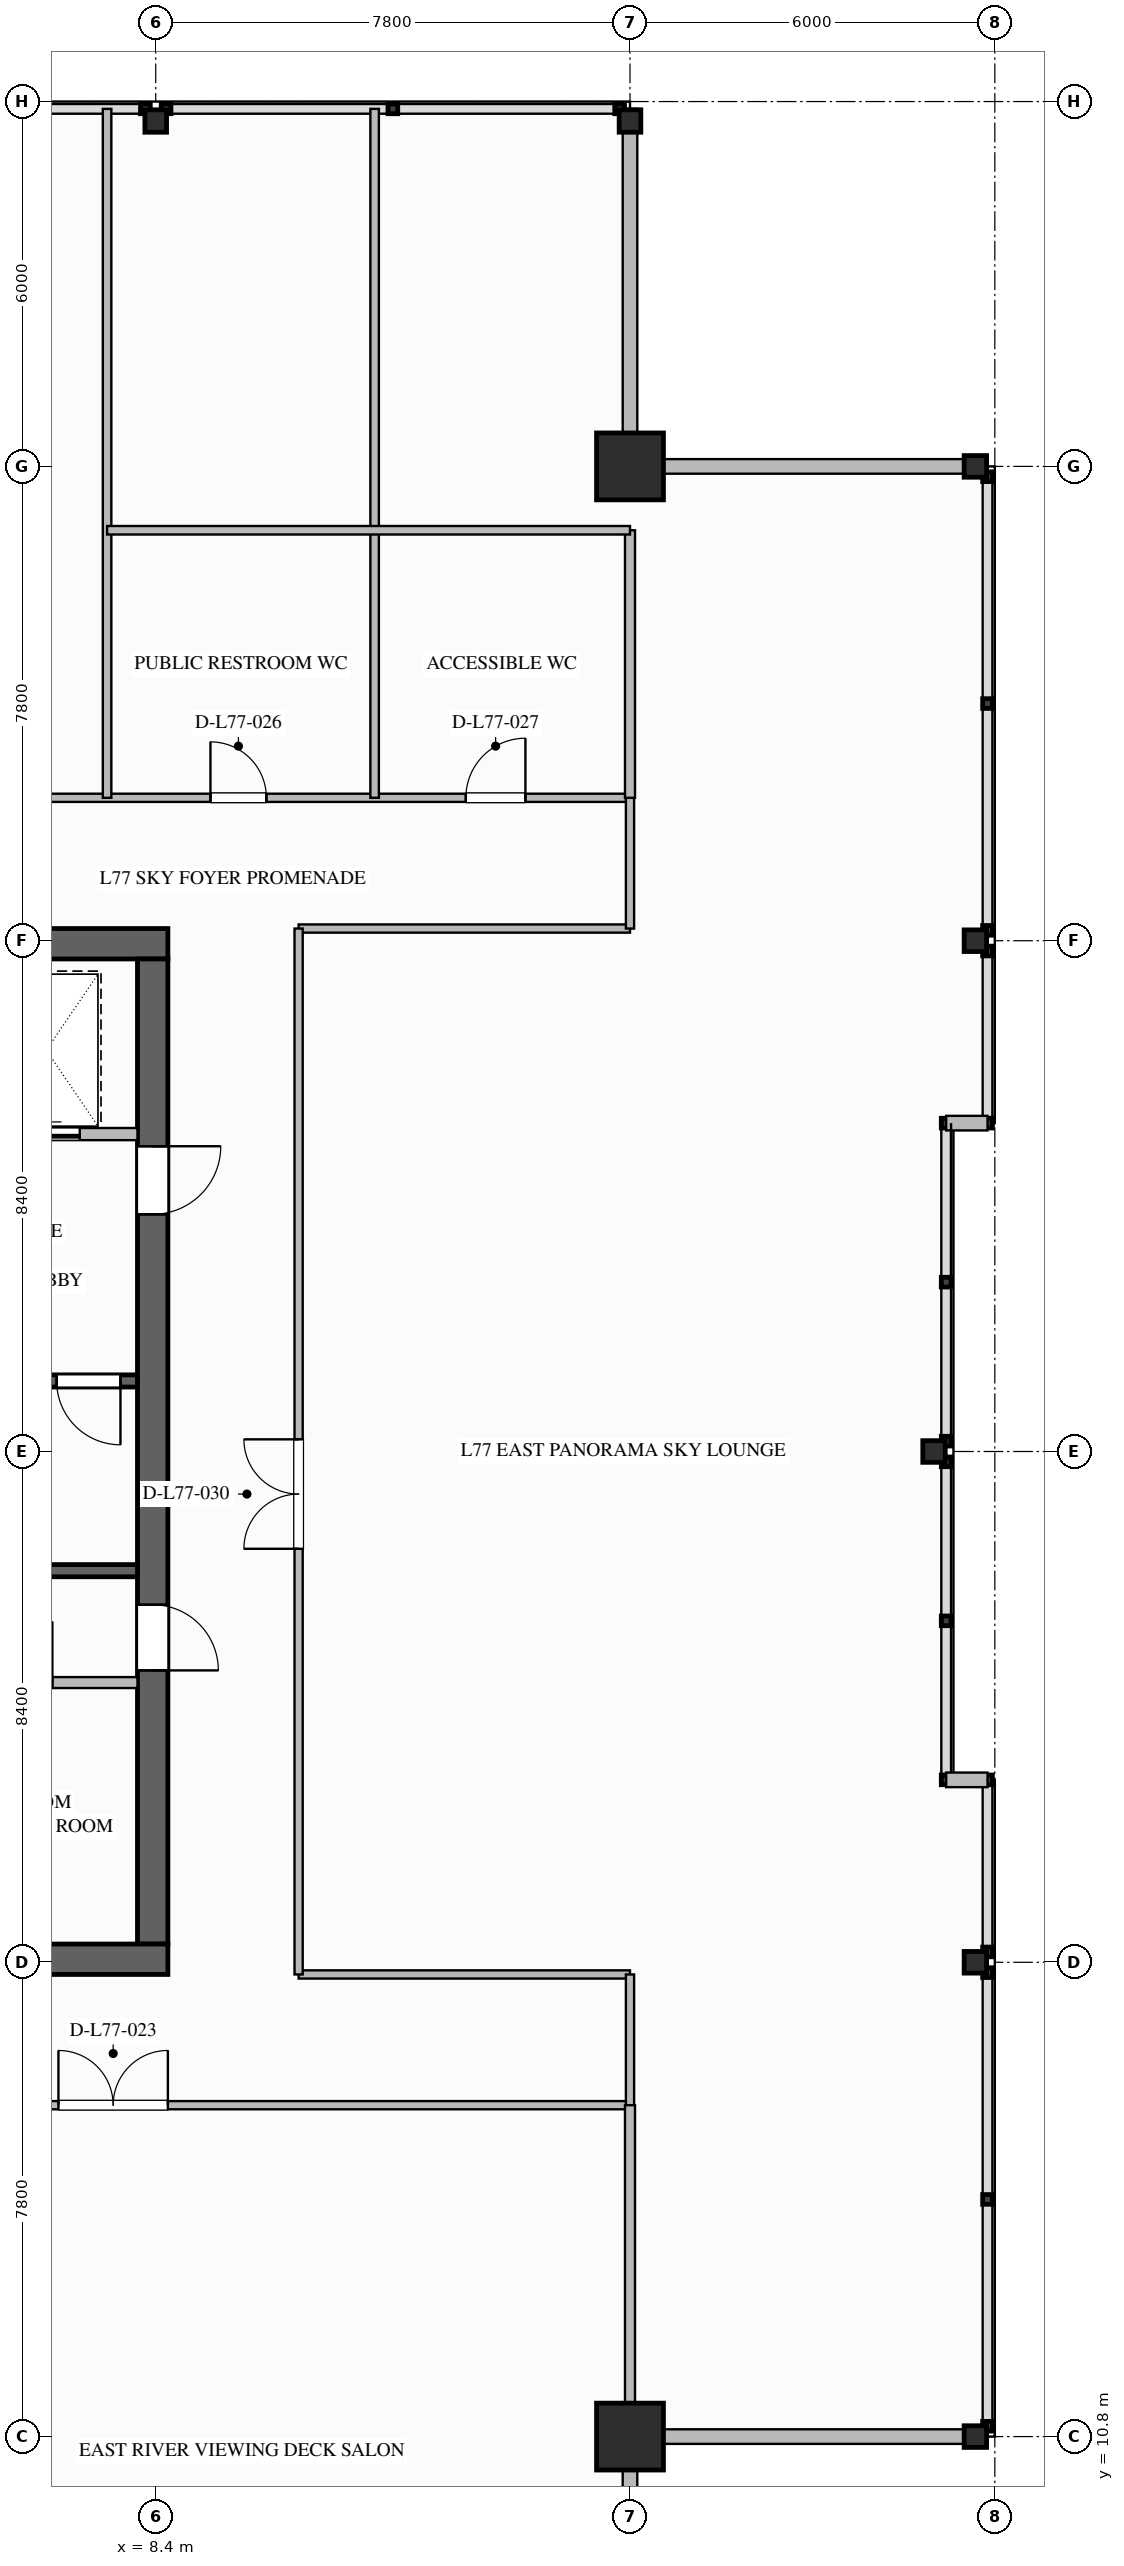
"""IFC4 building model, lengths in metres.
Left out: names, types, materials, properties, quantities, classifications, styles, units other than length and angle.
Written with IfcOpenShell. Run it as: python <this file> out.ifc"""

import sys

from ifc_helpers import new_model, si_unit, direction, frame, frame_2d, origin, origin_2d, place, context, subcontext, project, spatial, rectangle, i_section, extrude, element, fill, save


model = new_model("IFC4")
c1 = context("Model", 3, precision=1e-05, world=origin(), true_north=direction((0.0, 1.0)))
c2 = subcontext(c1, "Body", "Model", "MODEL_VIEW")
j1 = project(units=[si_unit("LENGTHUNIT", "METRE"), si_unit("PLANEANGLEUNIT", "RADIAN")], contexts=[c1])
p1 = place(None, origin())
s1 = spatial("IfcSite", under=j1, at=p1, CompositionType="ELEMENT")
p2 = place(p1, origin())
s2 = spatial("IfcBuilding", under=s1, at=p2, CompositionType="ELEMENT")
p3 = place(p2, frame((0.0, 0.0, 294.2)))
s3 = spatial("IfcBuildingStorey", under=s2, at=p3, CompositionType="ELEMENT", Elevation=294.2)
p4 = place(p3, frame((-8.6, 35.35, 0.0), z_axis=(0.0, 0.0, 1.0), x_axis=(1.0, 0.0, 0.0)))
e1 = element("IfcWall", 1, at=p4, inside=s3, PredefinedType="SHEAR", context=c2, shape_type="SweptSolid", body=[
    extrude(rectangle(XDim=17.2, YDim=0.5, at=frame_2d((8.6, 0.0))), origin(), (0.0, 0.0, 1.0), 4.4),
])
p5 = place(p3, frame((8.35, 35.1, 0.0), z_axis=(0.0, 0.0, 1.0), x_axis=(0.0, -1.0, 0.0)))
e2 = element("IfcWall", 2, at=p5, inside=s3, PredefinedType="SHEAR", context=c2, shape_type="SweptSolid", body=[
    extrude(rectangle(XDim=16.2, YDim=0.5, at=frame_2d((8.1, 0.0))), origin(), (0.0, 0.0, 1.0), 4.4),
])
p6 = place(p5, frame((3.08, 0.0, 0.0)))
e3 = element("IfcOpeningElement", 3, at=p6, cuts=e2, PredefinedType="OPENING", context=c2, shape_type="SweptSolid", body=[
    extrude(rectangle(XDim=1.12, YDim=2.1, at=frame_2d((0.56, 1.05))), frame((0.0, 0.26, 0.0), z_axis=(0.0, -1.0, 0.0), x_axis=(1.0, 0.0, 0.0)), (0.0, 0.0, 1.0), 0.52),
])
p7 = place(p5, frame((10.62, 0.0, 0.0)))
e4 = element("IfcOpeningElement", 4, at=p7, cuts=e2, PredefinedType="OPENING", context=c2, shape_type="SweptSolid", body=[
    extrude(rectangle(XDim=1.08, YDim=2.04, at=frame_2d((0.54, 1.02))), frame((0.0, 0.26, 0.0), z_axis=(0.0, -1.0, 0.0), x_axis=(1.0, 0.0, 0.0)), (0.0, 0.0, 1.0), 0.52),
])
p8 = place(p3, frame((8.6, 18.65, 0.0), z_axis=(0.0, 0.0, 1.0), x_axis=(-1.0, 0.0, 0.0)))
e5 = element("IfcWall", 5, at=p8, inside=s3, PredefinedType="SHEAR", context=c2, shape_type="SweptSolid", body=[
    extrude(rectangle(XDim=17.2, YDim=0.5, at=frame_2d((8.6, 0.0))), origin(), (0.0, 0.0, 1.0), 4.4),
])
for number, where, z_axis, x_axis in (
    (6, (16.2, 10.8, 0.0), (0.0, 0.0, 1.0), (1.0, 0.0, 0.0)),
    (7, (16.2, 43.2, 0.0), (0.0, 0.0, 1.0), (1.0, 0.0, 0.0)),
):
    element("IfcColumn", number, at=place(p3, frame(where, z_axis=z_axis, x_axis=x_axis)), inside=s3, PredefinedType="COLUMN", context=c2, shape_type="SweptSolid", body=[
        extrude(rectangle(XDim=1.1, YDim=1.1, at=origin_2d()), origin(), (0.0, 0.0, 1.0), 4.4),
    ])
for number, where, z_axis, x_axis in (
    (8, (21.88, 10.8, 0.0), (0.0, 0.0, 1.0), (1.0, 0.0, 0.0)),
    (9, (21.88, 18.6, 0.0), (0.0, 0.0, 1.0), (1.0, 0.0, 0.0)),
    (10, (21.2, 27.0, 0.0), (0.0, 0.0, 1.0), (1.0, 0.0, 0.0)),
    (11, (21.88, 35.4, 0.0), (0.0, 0.0, 1.0), (1.0, 0.0, 0.0)),
    (12, (21.88, 43.2, 0.0), (0.0, 0.0, 1.0), (1.0, 0.0, 0.0)),
    (13, (8.4, 48.88, 0.0), (0.0, 0.0, 1.0), (0.0, 1.0, 0.0)),
    (14, (16.2, 48.88, 0.0), (0.0, 0.0, 1.0), (0.0, 1.0, 0.0)),
):
    element("IfcColumn", number, at=place(p3, frame(where, z_axis=z_axis, x_axis=x_axis)), inside=s3, PredefinedType="COLUMN", context=c2, shape_type="SweptSolid", body=[
        extrude(i_section(OverallWidth=0.369, OverallDepth=0.356, WebThickness=0.011, FlangeThickness=0.018, FilletRadius=0.025, at=origin_2d()), origin(), (0.0, 0.0, 1.0), 4.397),
    ])
for number, where, z_axis, x_axis in (
    (15, (16.2, 49.08, 0.0), (0.0, 0.0, 1.0), (0.0, -1.0, 0.0)),
    (16, (16.2, 43.2, 0.0), (0.0, 0.0, 1.0), (1.0, 0.0, 0.0)),
    (17, (22.08, 10.8, 0.0), (0.0, 0.0, 1.0), (-1.0, 0.0, 0.0)),
    (18, (16.2, 10.8, 0.0), (0.0, 0.0, 1.0), (0.0, -1.0, 0.0)),
):
    element("IfcWall", number, at=place(p3, frame(where, z_axis=z_axis, x_axis=x_axis)), inside=s3, PredefinedType="STANDARD", context=c2, shape_type="SweptSolid", body=[
        extrude(rectangle(XDim=5.88, YDim=0.24, at=frame_2d((2.94, 0.0))), origin(), (0.0, 0.0, 1.0), 3.489),
    ])
for number, where, z_axis, x_axis in (
    (19, (22.08, 32.4, 0.0), (0.0, 0.0, 1.0), (-1.0, 0.0, 0.0)),
    (20, (21.4, 21.6, 0.0), (0.0, 0.0, 1.0), (1.0, 0.0, 0.0)),
):
    element("IfcWall", number, at=place(p3, frame(where, z_axis=z_axis, x_axis=x_axis)), inside=s3, PredefinedType="STANDARD", context=c2, shape_type="SweptSolid", body=[
        extrude(rectangle(XDim=0.68, YDim=0.24, at=frame_2d((0.34, 0.0))), origin(), (0.0, 0.0, 1.0), 4.1),
    ])
p9 = place(p3, frame((0.0, 25.04, 0.0), z_axis=(0.0, 0.0, 1.0), x_axis=(1.0, 0.0, 0.0)))
e21 = element("IfcWall", 21, at=p9, inside=s3, PredefinedType="SOLIDWALL", context=c2, shape_type="SweptSolid", body=[
    extrude(rectangle(XDim=8.1, YDim=0.2, at=frame_2d((4.05, 0.0))), origin(), (0.0, 0.0, 1.0), 4.1),
])
p10 = place(p3, frame((8.1, 28.16, 0.0), z_axis=(0.0, 0.0, 1.0), x_axis=(-1.0, 0.0, 0.0)))
e22 = element("IfcWall", 22, at=p10, inside=s3, PredefinedType="SOLIDWALL", context=c2, shape_type="SweptSolid", body=[
    extrude(rectangle(XDim=8.1, YDim=0.2, at=frame_2d((4.05, 0.0))), origin(), (0.0, 0.0, 1.0), 4.1),
])
p11 = place(p10, frame((0.28, 0.0, 0.0)))
e23 = element("IfcOpeningElement", 23, at=p11, cuts=e22, PredefinedType="OPENING", context=c2, shape_type="SweptSolid", body=[
    extrude(rectangle(XDim=1.05, YDim=2.1, at=frame_2d((0.525, 1.05))), frame((0.0, 0.11, 0.0), z_axis=(0.0, -1.0, 0.0), x_axis=(1.0, 0.0, 0.0)), (0.0, 0.0, 1.0), 0.22),
])
p12 = place(p3, frame((3.1, 32.22, 0.0), z_axis=(0.0, 0.0, 1.0), x_axis=(1.0, 0.0, 0.0)))
e24 = element("IfcWall", 24, at=p12, inside=s3, PredefinedType="SOLIDWALL", context=c2, shape_type="SweptSolid", body=[
    extrude(rectangle(XDim=5.0, YDim=0.2, at=frame_2d((2.5, 0.0))), origin(), (0.0, 0.0, 1.0), 4.1),
])
p13 = place(p12, frame((0.55, 0.0, 0.0)))
e25 = element("IfcOpeningElement", 25, at=p13, cuts=e24, PredefinedType="OPENING", context=c2, shape_type="SweptSolid", body=[
    extrude(rectangle(XDim=1.2, YDim=2.2, at=frame_2d((0.6, 1.1))), frame((0.0, 0.11, 0.0), z_axis=(0.0, -1.0, 0.0), x_axis=(1.0, 0.0, 0.0)), (0.0, 0.0, 1.0), 0.22),
])
p14 = place(p12, frame((2.85, 0.0, 0.0)))
e26 = element("IfcOpeningElement", 26, at=p14, cuts=e24, PredefinedType="OPENING", context=c2, shape_type="SweptSolid", body=[
    extrude(rectangle(XDim=1.2, YDim=2.2, at=frame_2d((0.6, 1.1))), frame((0.0, 0.11, 0.0), z_axis=(0.0, -1.0, 0.0), x_axis=(1.0, 0.0, 0.0)), (0.0, 0.0, 1.0), 0.22),
])
p15 = place(p3, frame((-8.1, 23.2, 0.0), z_axis=(0.0, 0.0, 1.0), x_axis=(1.0, 0.0, 0.0)))
e27 = element("IfcWall", 27, at=p15, inside=s3, PredefinedType="SOLIDWALL", context=c2, shape_type="SweptSolid", body=[
    extrude(rectangle(XDim=16.2, YDim=0.18, at=frame_2d((8.1, 0.0))), origin(), (0.0, 0.0, 1.0), 4.1),
])
p16 = place(p15, frame((1.4, 0.0, 0.0)))
e28 = element("IfcOpeningElement", 28, at=p16, cuts=e27, PredefinedType="OPENING", context=c2, shape_type="SweptSolid", body=[
    extrude(rectangle(XDim=1.0, YDim=2.1, at=frame_2d((0.5, 1.05))), frame((0.0, 0.1, 0.0), z_axis=(0.0, -1.0, 0.0), x_axis=(1.0, 0.0, 0.0)), (0.0, 0.0, 1.0), 0.2),
])
p17 = place(p15, frame((5.6, 0.0, 0.0)))
e29 = element("IfcOpeningElement", 29, at=p17, cuts=e27, PredefinedType="OPENING", context=c2, shape_type="SweptSolid", body=[
    extrude(rectangle(XDim=1.0, YDim=2.1, at=frame_2d((0.5, 1.05))), frame((0.0, 0.1, 0.0), z_axis=(0.0, -1.0, 0.0), x_axis=(1.0, 0.0, 0.0)), (0.0, 0.0, 1.0), 0.2),
])
p18 = place(p15, frame((9.8, 0.0, 0.0)))
e30 = element("IfcOpeningElement", 30, at=p18, cuts=e27, PredefinedType="OPENING", context=c2, shape_type="SweptSolid", body=[
    extrude(rectangle(XDim=0.92, YDim=2.1, at=frame_2d((0.46, 1.05))), frame((0.0, 0.1, 0.0), z_axis=(0.0, -1.0, 0.0), x_axis=(1.0, 0.0, 0.0)), (0.0, 0.0, 1.0), 0.2),
])
p19 = place(p15, frame((13.8, 0.0, 0.0)))
e31 = element("IfcOpeningElement", 31, at=p19, cuts=e27, PredefinedType="OPENING", context=c2, shape_type="SweptSolid", body=[
    extrude(rectangle(XDim=1.0, YDim=2.1, at=frame_2d((0.5, 1.05))), frame((0.0, 0.1, 0.0), z_axis=(0.0, -1.0, 0.0), x_axis=(1.0, 0.0, 0.0)), (0.0, 0.0, 1.0), 0.2),
])
p20 = place(p3, frame((-16.2, 16.25, 0.0), z_axis=(0.0, 0.0, 1.0), x_axis=(1.0, 0.0, 0.0)))
e32 = element("IfcWall", 32, at=p20, inside=s3, PredefinedType="PARTITIONING", context=c2, shape_type="SweptSolid", body=[
    extrude(rectangle(XDim=32.4, YDim=0.135, at=frame_2d((16.2, 0.0))), origin(), (0.0, 0.0, 1.0), 4.1),
])
p21 = place(p20, frame((5.0, 0.0, 0.0)))
e33 = element("IfcOpeningElement", 33, at=p21, cuts=e32, PredefinedType="OPENING", context=c2, shape_type="SweptSolid", body=[
    extrude(rectangle(XDim=1.8, YDim=2.35, at=frame_2d((0.9, 1.175))), frame((0.0, 0.077, 0.0), z_axis=(0.0, -1.0, 0.0), x_axis=(1.0, 0.0, 0.0)), (0.0, 0.0, 1.0), 0.155),
])
p22 = place(p20, frame((23.0, 0.0, 0.0)))
e34 = element("IfcOpeningElement", 34, at=p22, cuts=e32, PredefinedType="OPENING", context=c2, shape_type="SweptSolid", body=[
    extrude(rectangle(XDim=1.8, YDim=2.35, at=frame_2d((0.9, 1.175))), frame((0.0, 0.077, 0.0), z_axis=(0.0, -1.0, 0.0), x_axis=(1.0, 0.0, 0.0)), (0.0, 0.0, 1.0), 0.155),
])
p23 = place(p3, frame((-16.2, 37.75, 0.0), z_axis=(0.0, 0.0, 1.0), x_axis=(1.0, 0.0, 0.0)))
e35 = element("IfcWall", 35, at=p23, inside=s3, PredefinedType="PARTITIONING", context=c2, shape_type="SweptSolid", body=[
    extrude(rectangle(XDim=32.4, YDim=0.135, at=frame_2d((16.2, 0.0))), origin(), (0.0, 0.0, 1.0), 4.1),
])
p24 = place(p23, frame((4.0, 0.0, 0.0)))
e36 = element("IfcOpeningElement", 36, at=p24, cuts=e35, PredefinedType="OPENING", context=c2, shape_type="SweptSolid", body=[
    extrude(rectangle(XDim=1.26, YDim=2.2, at=frame_2d((0.63, 1.1))), frame((0.0, 0.077, 0.0), z_axis=(0.0, -1.0, 0.0), x_axis=(1.0, 0.0, 0.0)), (0.0, 0.0, 1.0), 0.155),
])
p25 = place(p23, frame((16.3, 0.0, 0.0)))
e37 = element("IfcOpeningElement", 37, at=p25, cuts=e35, PredefinedType="OPENING", context=c2, shape_type="SweptSolid", body=[
    extrude(rectangle(XDim=1.26, YDim=2.2, at=frame_2d((0.63, 1.1))), frame((0.0, 0.077, 0.0), z_axis=(0.0, -1.0, 0.0), x_axis=(1.0, 0.0, 0.0)), (0.0, 0.0, 1.0), 0.155),
])
p26 = place(p23, frame((25.5, 0.0, 0.0)))
e38 = element("IfcOpeningElement", 38, at=p26, cuts=e35, PredefinedType="OPENING", context=c2, shape_type="SweptSolid", body=[
    extrude(rectangle(XDim=0.92, YDim=2.1, at=frame_2d((0.46, 1.05))), frame((0.0, 0.077, 0.0), z_axis=(0.0, -1.0, 0.0), x_axis=(1.0, 0.0, 0.0)), (0.0, 0.0, 1.0), 0.155),
])
p27 = place(p23, frame((29.7, 0.0, 0.0)))
e39 = element("IfcOpeningElement", 39, at=p27, cuts=e35, PredefinedType="OPENING", context=c2, shape_type="SweptSolid", body=[
    extrude(rectangle(XDim=0.98, YDim=2.1, at=frame_2d((0.49, 1.05))), frame((0.0, 0.077, 0.0), z_axis=(0.0, -1.0, 0.0), x_axis=(1.0, 0.0, 0.0)), (0.0, 0.0, 1.0), 0.155),
])
for number, where, z_axis, x_axis in (
    (40, (10.75, 18.4, 0.0), (0.0, 0.0, 1.0), (1.0, 0.0, 0.0)),
    (41, (10.75, 35.6, 0.0), (0.0, 0.0, 1.0), (1.0, 0.0, 0.0)),
):
    element("IfcWall", number, at=place(p3, frame(where, z_axis=z_axis, x_axis=x_axis)), inside=s3, PredefinedType="PARTITIONING", context=c2, shape_type="SweptSolid", body=[
        extrude(rectangle(XDim=5.45, YDim=0.135, at=frame_2d((2.725, 0.0))), origin(), (0.0, 0.0, 1.0), 3.478),
    ])
p28 = place(p3, frame((10.75, 18.4, 0.0), z_axis=(0.0, 0.0, 1.0), x_axis=(0.0, 1.0, 0.0)))
e42 = element("IfcWall", 42, at=p28, inside=s3, PredefinedType="PARTITIONING", context=c2, shape_type="SweptSolid", body=[
    extrude(rectangle(XDim=17.2, YDim=0.135, at=frame_2d((8.6, 0.0))), origin(), (0.0, 0.0, 1.0), 4.1),
])
p29 = place(p28, frame((7.0, 0.0, 0.0)))
e43 = element("IfcOpeningElement", 43, at=p29, cuts=e42, PredefinedType="OPENING", context=c2, shape_type="SweptSolid", body=[
    extrude(rectangle(XDim=1.8, YDim=2.35, at=frame_2d((0.9, 1.175))), frame((0.0, 0.077, 0.0), z_axis=(0.0, -1.0, 0.0), x_axis=(1.0, 0.0, 0.0)), (0.0, 0.0, 1.0), 0.155),
])
for number, where, z_axis, x_axis in (
    (44, (16.2, 16.25, 0.0), (0.0, 0.0, 1.0), (0.0, 1.0, 0.0)),
    (45, (16.2, 35.6, 0.0), (0.0, 0.0, 1.0), (0.0, 1.0, 0.0)),
):
    element("IfcWall", number, at=place(p3, frame(where, z_axis=z_axis, x_axis=x_axis)), inside=s3, PredefinedType="PARTITIONING", context=c2, shape_type="SweptSolid", body=[
        extrude(rectangle(XDim=2.15, YDim=0.135, at=frame_2d((1.075, 0.0))), origin(), (0.0, 0.0, 1.0), 3.474),
    ])
p30 = place(p3, frame((16.2, 10.92, 0.0), z_axis=(0.0, 0.0, 1.0), x_axis=(0.0, 1.0, 0.0)))
e46 = element("IfcWall", 46, at=p30, inside=s3, PredefinedType="PARTITIONING", context=c2, shape_type="SweptSolid", body=[
    extrude(rectangle(XDim=5.33, YDim=0.165, at=frame_2d((2.665, 0.0))), origin(), (0.0, 0.0, 1.0), 3.474),
])
p31 = place(p3, frame((16.2, 37.75, 0.0), z_axis=(0.0, 0.0, 1.0), x_axis=(0.0, 1.0, 0.0)))
e47 = element("IfcWall", 47, at=p31, inside=s3, PredefinedType="PARTITIONING", context=c2, shape_type="SweptSolid", body=[
    extrude(rectangle(XDim=4.4, YDim=0.165, at=frame_2d((2.2, 0.0))), origin(), (0.0, 0.0, 1.0), 3.474),
])
for number, where, z_axis, x_axis in (
    (48, (7.6, 37.75, 0.0), (0.0, 0.0, 1.0), (0.0, 1.0, 0.0)),
    (49, (12.0, 37.75, 0.0), (0.0, 0.0, 1.0), (0.0, 1.0, 0.0)),
):
    element("IfcWall", number, at=place(p3, frame(where, z_axis=z_axis, x_axis=x_axis)), inside=s3, PredefinedType="PLUMBINGWALL", context=c2, shape_type="SweptSolid", body=[
        extrude(rectangle(XDim=11.33, YDim=0.14, at=frame_2d((5.665, 0.0))), origin(), (0.0, 0.0, 1.0), 4.1),
    ])
p32 = place(p3, frame((7.6, 42.15, 0.0), z_axis=(0.0, 0.0, 1.0), x_axis=(1.0, 0.0, 0.0)))
e50 = element("IfcWall", 50, at=p32, inside=s3, PredefinedType="PLUMBINGWALL", context=c2, shape_type="SweptSolid", body=[
    extrude(rectangle(XDim=8.6, YDim=0.14, at=frame_2d((4.3, 0.0))), origin(), (0.0, 0.0, 1.0), 4.1),
])
p33 = place(p11, origin())
e51 = element("IfcDoor", 51, at=p33, inside=s3, OperationType="SINGLE_SWING_LEFT", PredefinedType="DOOR", context=c2, shape_type="SweptSolid", body=[
    extrude(rectangle(XDim=1.05, YDim=2.1, at=frame_2d((0.525, 1.05))), frame((0.0, 0.025, 0.0), z_axis=(0.0, -1.0, 0.0), x_axis=(1.0, 0.0, 0.0)), (0.0, 0.0, 1.0), 0.05),
])
fill(e23, e51)
p34 = place(p14, origin())
e52 = element("IfcDoor", 52, at=p34, inside=s3, OperationType="SLIDING_TO_LEFT", PredefinedType="DOOR", context=c2, shape_type="SweptSolid", body=[
    extrude(rectangle(XDim=1.2, YDim=2.2, at=frame_2d((0.6, 1.1))), frame((0.0, 0.025, 0.0), z_axis=(0.0, -1.0, 0.0), x_axis=(1.0, 0.0, 0.0)), (0.0, 0.0, 1.0), 0.05),
])
fill(e26, e52)
p35 = place(p6, origin())
e53 = element("IfcDoor", 53, at=p35, inside=s3, OperationType="SINGLE_SWING_LEFT", PredefinedType="DOOR", context=c2, shape_type="SweptSolid", body=[
    extrude(rectangle(XDim=1.12, YDim=2.1, at=frame_2d((0.56, 1.05))), frame((0.0, 0.025, 0.0), z_axis=(0.0, -1.0, 0.0), x_axis=(1.0, 0.0, 0.0)), (0.0, 0.0, 1.0), 0.05),
])
fill(e3, e53)
p36 = place(p7, origin())
e54 = element("IfcDoor", 54, at=p36, inside=s3, OperationType="SINGLE_SWING_RIGHT", PredefinedType="DOOR", context=c2, shape_type="SweptSolid", body=[
    extrude(rectangle(XDim=1.08, YDim=2.04, at=frame_2d((0.54, 1.02))), frame((0.0, 0.025, 0.0), z_axis=(0.0, -1.0, 0.0), x_axis=(1.0, 0.0, 0.0)), (0.0, 0.0, 1.0), 0.05),
])
fill(e4, e54)
p37 = place(p22, origin())
e55 = element("IfcDoor", 55, at=p37, inside=s3, OperationType="DOUBLE_DOOR_SINGLE_SWING", PredefinedType="DOOR", context=c2, shape_type="SweptSolid", body=[
    extrude(rectangle(XDim=1.8, YDim=2.35, at=frame_2d((0.9, 1.175))), frame((0.0, 0.025, 0.0), z_axis=(0.0, -1.0, 0.0), x_axis=(1.0, 0.0, 0.0)), (0.0, 0.0, 1.0), 0.05),
])
fill(e34, e55)
p38 = place(p26, origin())
e56 = element("IfcDoor", 56, at=p38, inside=s3, OperationType="SINGLE_SWING_LEFT", PredefinedType="DOOR", context=c2, shape_type="SweptSolid", body=[
    extrude(rectangle(XDim=0.92, YDim=2.1, at=frame_2d((0.46, 1.05))), frame((0.0, 0.025, 0.0), z_axis=(0.0, -1.0, 0.0), x_axis=(1.0, 0.0, 0.0)), (0.0, 0.0, 1.0), 0.05),
])
fill(e38, e56)
p39 = place(p27, origin())
e57 = element("IfcDoor", 57, at=p39, inside=s3, OperationType="SINGLE_SWING_RIGHT", PredefinedType="DOOR", context=c2, shape_type="SweptSolid", body=[
    extrude(rectangle(XDim=0.98, YDim=2.1, at=frame_2d((0.49, 1.05))), frame((0.0, 0.025, 0.0), z_axis=(0.0, -1.0, 0.0), x_axis=(1.0, 0.0, 0.0)), (0.0, 0.0, 1.0), 0.05),
])
fill(e39, e57)
p40 = place(p29, origin())
e58 = element("IfcDoor", 58, at=p40, inside=s3, OperationType="DOUBLE_DOOR_SINGLE_SWING", PredefinedType="DOOR", context=c2, shape_type="SweptSolid", body=[
    extrude(rectangle(XDim=1.8, YDim=2.35, at=frame_2d((0.9, 1.175))), frame((0.0, 0.025, 0.0), z_axis=(0.0, -1.0, 0.0), x_axis=(1.0, 0.0, 0.0)), (0.0, 0.0, 1.0), 0.05),
])
fill(e43, e58)
save(model, sys.argv[1])
